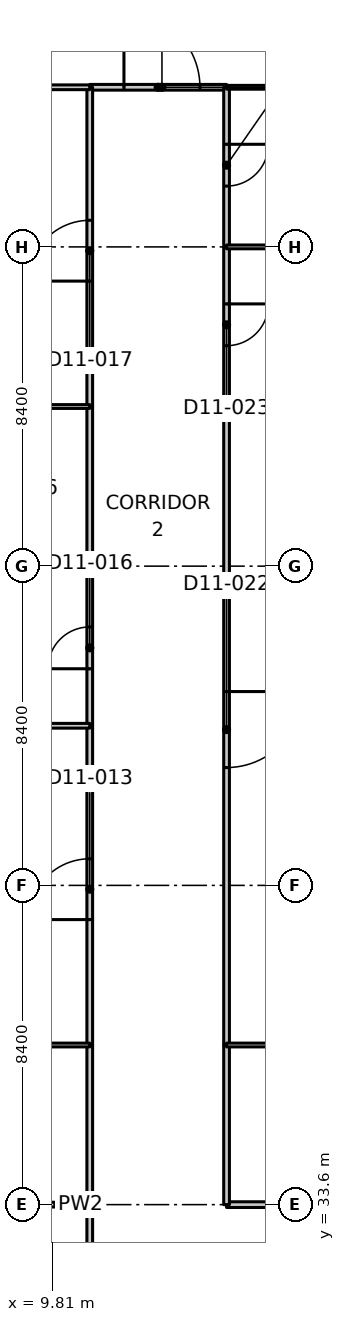
"""IFC4 building model, lengths in metres.
Left out: names, types, materials, properties, quantities, classifications, styles, units other than length and angle.
Written with IfcOpenShell. Run it as: python <this file> out.ifc"""

import sys

from ifc_helpers import new_model, si_unit, direction, frame, frame_2d, origin, place, context, subcontext, project, spatial, polyline, rectangle, outline, extrude, element, fill, save


model = new_model("IFC4")
c1 = context("Model", 3, precision=1e-05, world=origin(), true_north=direction((0.0, 1.0)))
c2 = subcontext(c1, "Body", "Model", "MODEL_VIEW")
j1 = project(units=[si_unit("LENGTHUNIT", "METRE"), si_unit("PLANEANGLEUNIT", "RADIAN")], contexts=[c1])
p1 = place(None, origin())
s1 = spatial("IfcSite", under=j1, at=p1, CompositionType="ELEMENT")
p2 = place(p1, origin())
s2 = spatial("IfcBuilding", under=s1, at=p2, CompositionType="ELEMENT")
p3 = place(p2, frame((0.0, 0.0, 79.7)))
s3 = spatial("IfcBuildingStorey", under=s2, at=p3, CompositionType="ELEMENT", Elevation=79.7)
p4 = place(p3, frame((10.8, 25.2, 0.0), z_axis=(0.0, 0.0, 1.0), x_axis=(0.0, 1.0, 0.0)))
e1 = element("IfcWall", 1, at=p4, inside=s3, PredefinedType="PARTITIONING", context=c2, shape_type="SweptSolid", body=[
    extrude(rectangle(XDim=8.4, YDim=0.15, at=frame_2d((4.2, 0.0))), origin(), (0.0, 0.0, 1.0), 3.33),
])
p5 = place(p4, frame((3.3, 0.0, 0.0)))
e2 = element("IfcOpeningElement", 2, at=p5, cuts=e1, PredefinedType="OPENING", context=c2, shape_type="SweptSolid", body=[
    extrude(rectangle(XDim=1.6, YDim=2.1, at=frame_2d((0.8, 1.05))), frame((0.0, 0.085, 0.0), z_axis=(0.0, -1.0, 0.0), x_axis=(1.0, 0.0, 0.0)), (0.0, 0.0, 1.0), 0.17),
])
p6 = place(p3, frame((14.4, 33.6, 0.0), z_axis=(0.0, 0.0, 1.0), x_axis=(1.0, 0.0, 0.0)))
e3 = element("IfcWall", 3, at=p6, inside=s3, PredefinedType="PARTITIONING", context=c2, shape_type="SweptSolid", body=[
    extrude(rectangle(XDim=1.5, YDim=0.15, at=frame_2d((0.75, 0.0))), origin(), (0.0, 0.0, 1.0), 3.33),
])
p7 = place(p3, frame((10.8, 63.0, 0.0), z_axis=(0.0, 0.0, 1.0), x_axis=(1.0, 0.0, 0.0)))
e4 = element("IfcWall", 4, at=p7, inside=s3, PredefinedType="PARTITIONING", context=c2, shape_type="SweptSolid", body=[
    extrude(rectangle(XDim=3.6, YDim=0.15, at=frame_2d((1.8, 0.0))), origin(), (0.0, 0.0, 1.0), 3.33),
])
p8 = place(p7, frame((0.9, 0.0, 0.0)))
e5 = element("IfcOpeningElement", 5, at=p8, cuts=e4, PredefinedType="OPENING", context=c2, shape_type="SweptSolid", body=[
    extrude(rectangle(XDim=2.0, YDim=2.4, at=frame_2d((1.0, 1.2))), frame((0.0, 0.085, 0.0), z_axis=(0.0, -1.0, 0.0), x_axis=(1.0, 0.0, 0.0)), (0.0, 0.0, 1.0), 0.17),
])
p9 = place(p3, frame((10.8, 37.8, 0.0), z_axis=(0.0, 0.0, 1.0), x_axis=(0.0, 1.0, 0.0)))
e6 = element("IfcWall", 6, at=p9, inside=s3, PredefinedType="PARTITIONING", context=c2, shape_type="SweptSolid", body=[
    extrude(rectangle(XDim=8.4, YDim=0.15, at=frame_2d((4.2, 0.0))), origin(), (0.0, 0.0, 1.0), 3.33),
])
p10 = place(p9, frame((3.3, 0.0, 0.0)))
e7 = element("IfcOpeningElement", 7, at=p10, cuts=e6, PredefinedType="OPENING", context=c2, shape_type="SweptSolid", body=[
    extrude(rectangle(XDim=1.6, YDim=2.1, at=frame_2d((0.8, 1.05))), frame((0.0, 0.085, 0.0), z_axis=(0.0, -1.0, 0.0), x_axis=(1.0, 0.0, 0.0)), (0.0, 0.0, 1.0), 0.17),
])
p11 = place(p3, frame((10.8, 33.6, 0.0), z_axis=(0.0, 0.0, 1.0), x_axis=(0.0, 1.0, 0.0)))
e8 = element("IfcWall", 8, at=p11, inside=s3, PredefinedType="PARTITIONING", context=c2, shape_type="SweptSolid", body=[
    extrude(rectangle(XDim=4.2, YDim=0.15, at=frame_2d((2.1, 0.0))), origin(), (0.0, 0.0, 1.0), 3.33),
])
p12 = place(p3, frame((10.8, 46.2, 0.0), z_axis=(0.0, 0.0, 1.0), x_axis=(0.0, 1.0, 0.0)))
e9 = element("IfcWall", 9, at=p12, inside=s3, PredefinedType="PARTITIONING", context=c2, shape_type="SweptSolid", body=[
    extrude(rectangle(XDim=4.2, YDim=0.15, at=frame_2d((2.1, 0.0))), origin(), (0.0, 0.0, 1.0), 3.33),
])
p13 = place(p12, frame((1.5, 0.0, 0.0)))
e10 = element("IfcOpeningElement", 10, at=p13, cuts=e9, PredefinedType="OPENING", context=c2, shape_type="SweptSolid", body=[
    extrude(rectangle(XDim=1.1, YDim=2.1, at=frame_2d((0.55, 1.05))), frame((0.0, 0.085, 0.0), z_axis=(0.0, -1.0, 0.0), x_axis=(1.0, 0.0, 0.0)), (0.0, 0.0, 1.0), 0.17),
])
p14 = place(p3, frame((10.8, 54.6, 0.0), z_axis=(0.0, 0.0, 1.0), x_axis=(0.0, 1.0, 0.0)))
e11 = element("IfcWall", 11, at=p14, inside=s3, PredefinedType="PARTITIONING", context=c2, shape_type="SweptSolid", body=[
    extrude(rectangle(XDim=8.4, YDim=0.15, at=frame_2d((4.2, 0.0))), origin(), (0.0, 0.0, 1.0), 3.33),
])
p15 = place(p14, frame((3.3, 0.0, 0.0)))
e12 = element("IfcOpeningElement", 12, at=p15, cuts=e11, PredefinedType="OPENING", context=c2, shape_type="SweptSolid", body=[
    extrude(rectangle(XDim=1.6, YDim=2.1, at=frame_2d((0.8, 1.05))), frame((0.0, 0.085, 0.0), z_axis=(0.0, -1.0, 0.0), x_axis=(1.0, 0.0, 0.0)), (0.0, 0.0, 1.0), 0.17),
])
p16 = place(p3, frame((10.8, 50.4, 0.0), z_axis=(0.0, 0.0, 1.0), x_axis=(0.0, 1.0, 0.0)))
e13 = element("IfcWall", 13, at=p16, inside=s3, PredefinedType="PARTITIONING", context=c2, shape_type="SweptSolid", body=[
    extrude(rectangle(XDim=4.2, YDim=0.15, at=frame_2d((2.1, 0.0))), origin(), (0.0, 0.0, 1.0), 3.33),
])
p17 = place(p3, frame((14.4, 37.8, 0.0), z_axis=(0.0, 0.0, 1.0), x_axis=(0.0, -1.0, 0.0)))
e14 = element("IfcWall", 14, at=p17, inside=s3, PredefinedType="PARTITIONING", context=c2, shape_type="SweptSolid", body=[
    extrude(rectangle(XDim=4.2, YDim=0.15, at=frame_2d((2.1, 0.0))), origin(), (0.0, 0.0, 1.0), 3.33),
])
p18 = place(p3, frame((14.4, 54.6, 0.0), z_axis=(0.0, 0.0, 1.0), x_axis=(0.0, -1.0, 0.0)))
e15 = element("IfcWall", 15, at=p18, inside=s3, PredefinedType="PARTITIONING", context=c2, shape_type="SweptSolid", body=[
    extrude(rectangle(XDim=16.8, YDim=0.15, at=frame_2d((8.4, 0.0))), origin(), (0.0, 0.0, 1.0), 3.33),
])
p19 = place(p18, frame((7.5, 0.0, 0.0)))
e16 = element("IfcOpeningElement", 16, at=p19, cuts=e15, PredefinedType="OPENING", context=c2, shape_type="SweptSolid", body=[
    extrude(rectangle(XDim=2.0, YDim=2.4, at=frame_2d((1.0, 1.2))), frame((0.0, 0.085, 0.0), z_axis=(0.0, -1.0, 0.0), x_axis=(1.0, 0.0, 0.0)), (0.0, 0.0, 1.0), 0.17),
])
p20 = place(p3, frame((14.4, 58.8, 0.0), z_axis=(0.0, 0.0, 1.0), x_axis=(0.0, -1.0, 0.0)))
e17 = element("IfcWall", 17, at=p20, inside=s3, PredefinedType="PARTITIONING", context=c2, shape_type="SweptSolid", body=[
    extrude(rectangle(XDim=4.2, YDim=0.15, at=frame_2d((2.1, 0.0))), origin(), (0.0, 0.0, 1.0), 3.33),
])
p21 = place(p20, frame((1.5, 0.0, 0.0)))
e18 = element("IfcOpeningElement", 18, at=p21, cuts=e17, PredefinedType="OPENING", context=c2, shape_type="SweptSolid", body=[
    extrude(rectangle(XDim=1.1, YDim=2.1, at=frame_2d((0.55, 1.05))), frame((0.0, 0.085, 0.0), z_axis=(0.0, -1.0, 0.0), x_axis=(1.0, 0.0, 0.0)), (0.0, 0.0, 1.0), 0.17),
])
p22 = place(p3, frame((14.4, 63.0, 0.0), z_axis=(0.0, 0.0, 1.0), x_axis=(0.0, -1.0, 0.0)))
e19 = element("IfcWall", 19, at=p22, inside=s3, PredefinedType="PARTITIONING", context=c2, shape_type="SweptSolid", body=[
    extrude(rectangle(XDim=4.2, YDim=0.15, at=frame_2d((2.1, 0.0))), origin(), (0.0, 0.0, 1.0), 3.33),
])
p23 = place(p22, frame((1.5, 0.0, 0.0)))
e20 = element("IfcOpeningElement", 20, at=p23, cuts=e19, PredefinedType="OPENING", context=c2, shape_type="SweptSolid", body=[
    extrude(rectangle(XDim=1.1, YDim=2.1, at=frame_2d((0.55, 1.05))), frame((0.0, 0.085, 0.0), z_axis=(0.0, -1.0, 0.0), x_axis=(1.0, 0.0, 0.0)), (0.0, 0.0, 1.0), 0.17),
])
p24 = place(p3, frame((10.8, 63.0, 0.0), z_axis=(0.0, 0.0, 1.0), x_axis=(-1.0, 0.0, 0.0)))
e21 = element("IfcWall", 21, at=p24, inside=s3, PredefinedType="PARTITIONING", context=c2, shape_type="SweptSolid", body=[
    extrude(outline(polyline([(0.0, 0.0), (11.0, 0.0), (11.0, 3.33), (7.278, 3.33), (7.276, 2.98), (5.924, 2.98), (5.922, 3.33), (0.0, 3.33), (0.0, 0.0)])), frame((0.0, 0.062, 0.0), z_axis=(0.0, -1.0, 0.0), x_axis=(1.0, 0.0, 0.0)), (0.0, 0.0, 1.0), 0.125),
])
p25 = place(p3, frame((25.4, 63.0, 0.0), z_axis=(0.0, 0.0, 1.0), x_axis=(-1.0, 0.0, 0.0)))
e22 = element("IfcWall", 22, at=p25, inside=s3, PredefinedType="PARTITIONING", context=c2, shape_type="SweptSolid", body=[
    extrude(outline(polyline([(0.0, 0.0), (11.0, 0.0), (11.0, 3.33), (5.066, 3.33), (5.064, 2.98), (3.736, 2.98), (3.734, 3.33), (0.0, 3.33), (0.0, 0.0)])), frame((0.0, 0.05, 0.0), z_axis=(0.0, -1.0, 0.0), x_axis=(1.0, 0.0, 0.0)), (0.0, 0.0, 1.0), 0.1),
])
p26 = place(p3, frame((9.12, 33.6, 0.0), z_axis=(0.0, 0.0, 1.0), x_axis=(1.0, 0.0, 0.0)))
e23 = element("IfcWall", 23, at=p26, inside=s3, PredefinedType="PARTITIONING", context=c2, shape_type="SweptSolid", body=[
    extrude(rectangle(XDim=1.68, YDim=0.125, at=frame_2d((0.84, 0.0))), origin(), (0.0, 0.0, 1.0), 3.33),
])
p27 = place(p3, frame((10.8, 37.8, 0.0), z_axis=(0.0, 0.0, 1.0), x_axis=(-1.0, 0.0, 0.0)))
e24 = element("IfcWall", 24, at=p27, inside=s3, PredefinedType="PARTITIONING", context=c2, shape_type="SweptSolid", body=[
    extrude(rectangle(XDim=9.0, YDim=0.1, at=frame_2d((4.5, 0.0))), origin(), (0.0, 0.0, 1.0), 3.33),
])
p28 = place(p27, frame((3.9, 0.0, 0.0)))
e25 = element("IfcOpeningElement", 25, at=p28, cuts=e24, PredefinedType="OPENING", context=c2, shape_type="SweptSolid", body=[
    extrude(rectangle(XDim=1.0, YDim=2.1, at=frame_2d((0.5, 1.05))), frame((0.0, 0.06, 0.0), z_axis=(0.0, -1.0, 0.0), x_axis=(1.0, 0.0, 0.0)), (0.0, 0.0, 1.0), 0.12),
])
p29 = place(p3, frame((-1.174, 46.2, 0.0), z_axis=(0.0, 0.0, 1.0), x_axis=(1.0, 0.0, 0.0)))
e26 = element("IfcWall", 26, at=p29, inside=s3, PredefinedType="PARTITIONING", context=c2, shape_type="SweptSolid", body=[
    extrude(outline(polyline([(0.0, 0.0), (11.974, 0.0), (11.974, 3.33), (1.624, 3.33), (1.622, 2.98), (0.726, 2.98), (0.724, 3.33), (0.074, 3.33), (0.0, 3.33), (0.0, 0.0)])), frame((0.0, 0.062, 0.0), z_axis=(0.0, -1.0, 0.0), x_axis=(1.0, 0.0, 0.0)), (0.0, 0.0, 1.0), 0.125),
])
p30 = place(p3, frame((9.12, 50.4, 0.0), z_axis=(0.0, 0.0, 1.0), x_axis=(1.0, 0.0, 0.0)))
e27 = element("IfcWall", 27, at=p30, inside=s3, PredefinedType="PARTITIONING", context=c2, shape_type="SweptSolid", body=[
    extrude(rectangle(XDim=1.68, YDim=0.125, at=frame_2d((0.84, 0.0))), origin(), (0.0, 0.0, 1.0), 3.33),
])
p31 = place(p3, frame((10.8, 54.6, 0.0), z_axis=(0.0, 0.0, 1.0), x_axis=(-1.0, 0.0, 0.0)))
e28 = element("IfcWall", 28, at=p31, inside=s3, PredefinedType="PARTITIONING", context=c2, shape_type="SweptSolid", body=[
    extrude(rectangle(XDim=4.2, YDim=0.1, at=frame_2d((2.1, 0.0))), origin(), (0.0, 0.0, 1.0), 3.33),
])
p32 = place(p3, frame((14.4, 37.8, 0.0), z_axis=(0.0, 0.0, 1.0), x_axis=(1.0, 0.0, 0.0)))
e29 = element("IfcWall", 29, at=p32, inside=s3, PredefinedType="PARTITIONING", context=c2, shape_type="SweptSolid", body=[
    extrude(outline(polyline([(0.0, 0.0), (15.843, 0.0), (15.843, 3.33), (11.25, 3.33), (11.248, 2.98), (10.352, 2.98), (10.35, 3.33), (0.0, 3.33), (0.0, 0.0)])), frame((0.0, 0.05, 0.0), z_axis=(0.0, -1.0, 0.0), x_axis=(1.0, 0.0, 0.0)), (0.0, 0.0, 1.0), 0.1),
])
p33 = place(p3, frame((14.4, 54.6, 0.0), z_axis=(0.0, 0.0, 1.0), x_axis=(1.0, 0.0, 0.0)))
e30 = element("IfcWall", 30, at=p33, inside=s3, PredefinedType="PARTITIONING", context=c2, shape_type="SweptSolid", body=[
    extrude(outline(polyline([(0.0, 0.0), (11.974, 0.0), (11.974, 3.33), (11.9, 3.33), (11.25, 3.33), (11.248, 2.98), (10.352, 2.98), (10.35, 3.33), (0.0, 3.33), (0.0, 0.0)])), frame((0.0, 0.05, 0.0), z_axis=(0.0, -1.0, 0.0), x_axis=(1.0, 0.0, 0.0)), (0.0, 0.0, 1.0), 0.1),
])
p34 = place(p3, frame((14.4, 58.8, 0.0), z_axis=(0.0, 0.0, 1.0), x_axis=(1.0, 0.0, 0.0)))
e31 = element("IfcWall", 31, at=p34, inside=s3, PredefinedType="PARTITIONING", context=c2, shape_type="SweptSolid", body=[
    extrude(rectangle(XDim=1.68, YDim=0.1, at=frame_2d((0.84, 0.0))), origin(), (0.0, 0.0, 1.0), 3.33),
])
p35 = place(p8, origin())
e32 = element("IfcDoor", 32, at=p35, inside=s3, OperationType="DOUBLE_DOOR_SINGLE_SWING", PredefinedType="DOOR", context=c2, shape_type="SweptSolid", body=[
    extrude(rectangle(XDim=2.0, YDim=2.4, at=frame_2d((1.0, 1.2))), frame((0.0, 0.025, 0.0), z_axis=(0.0, -1.0, 0.0), x_axis=(1.0, 0.0, 0.0)), (0.0, 0.0, 1.0), 0.05),
])
fill(e5, e32)
p36 = place(p10, origin())
e33 = element("IfcDoor", 33, at=p36, inside=s3, OperationType="DOUBLE_DOOR_SINGLE_SWING", PredefinedType="DOOR", context=c2, shape_type="SweptSolid", body=[
    extrude(rectangle(XDim=1.6, YDim=2.1, at=frame_2d((0.8, 1.05))), frame((0.0, 0.025, 0.0), z_axis=(0.0, -1.0, 0.0), x_axis=(1.0, 0.0, 0.0)), (0.0, 0.0, 1.0), 0.05),
])
fill(e7, e33)
p37 = place(p13, origin())
e34 = element("IfcDoor", 34, at=p37, inside=s3, OperationType="SINGLE_SWING_LEFT", PredefinedType="DOOR", context=c2, shape_type="SweptSolid", body=[
    extrude(rectangle(XDim=1.1, YDim=2.1, at=frame_2d((0.55, 1.05))), frame((0.0, 0.025, 0.0), z_axis=(0.0, -1.0, 0.0), x_axis=(1.0, 0.0, 0.0)), (0.0, 0.0, 1.0), 0.05),
])
fill(e10, e34)
p38 = place(p15, origin())
e35 = element("IfcDoor", 35, at=p38, inside=s3, OperationType="DOUBLE_DOOR_SINGLE_SWING", PredefinedType="DOOR", context=c2, shape_type="SweptSolid", body=[
    extrude(rectangle(XDim=1.6, YDim=2.1, at=frame_2d((0.8, 1.05))), frame((0.0, 0.025, 0.0), z_axis=(0.0, -1.0, 0.0), x_axis=(1.0, 0.0, 0.0)), (0.0, 0.0, 1.0), 0.05),
])
fill(e12, e35)
p39 = place(p19, origin())
e36 = element("IfcDoor", 36, at=p39, inside=s3, OperationType="DOUBLE_DOOR_SINGLE_SWING", PredefinedType="DOOR", context=c2, shape_type="SweptSolid", body=[
    extrude(rectangle(XDim=2.0, YDim=2.4, at=frame_2d((1.0, 1.2))), frame((0.0, 0.025, 0.0), z_axis=(0.0, -1.0, 0.0), x_axis=(1.0, 0.0, 0.0)), (0.0, 0.0, 1.0), 0.05),
])
fill(e16, e36)
p40 = place(p21, origin())
e37 = element("IfcDoor", 37, at=p40, inside=s3, OperationType="SINGLE_SWING_LEFT", PredefinedType="DOOR", context=c2, shape_type="SweptSolid", body=[
    extrude(rectangle(XDim=1.1, YDim=2.1, at=frame_2d((0.55, 1.05))), frame((0.0, 0.025, 0.0), z_axis=(0.0, -1.0, 0.0), x_axis=(1.0, 0.0, 0.0)), (0.0, 0.0, 1.0), 0.05),
])
fill(e18, e37)
p41 = place(p23, origin())
e38 = element("IfcDoor", 38, at=p41, inside=s3, OperationType="SINGLE_SWING_LEFT", PredefinedType="DOOR", context=c2, shape_type="SweptSolid", body=[
    extrude(rectangle(XDim=1.1, YDim=2.1, at=frame_2d((0.55, 1.05))), frame((0.0, 0.025, 0.0), z_axis=(0.0, -1.0, 0.0), x_axis=(1.0, 0.0, 0.0)), (0.0, 0.0, 1.0), 0.05),
])
fill(e20, e38)
save(model, sys.argv[1])
